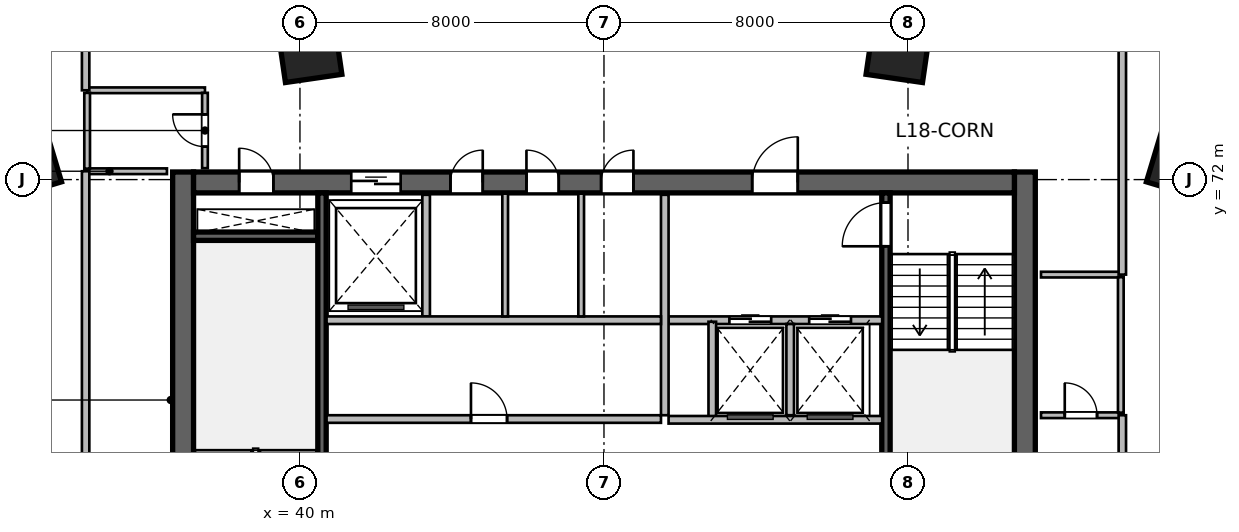
"""IFC4 building model, lengths in metres.
Left out: names, types, materials, properties, quantities, classifications, styles, units other than length and angle.
Written with IfcOpenShell. Run it as: python <this file> out.ifc"""

import sys

from ifc_helpers import new_model, si_unit, direction, frame, frame_2d, origin, origin_2d, place, context, subcontext, project, spatial, rectangle, extrude, source, transform, mapped, element, fill, save


model = new_model("IFC4")
c1 = context("Model", 3, precision=1e-05, world=origin(), true_north=direction((0.0, 1.0)))
c2 = subcontext(c1, "Body", "Model", "MODEL_VIEW")
j1 = project(units=[si_unit("LENGTHUNIT", "METRE"), si_unit("PLANEANGLEUNIT", "RADIAN")], contexts=[c1])
p1 = place(None, origin())
s1 = spatial("IfcSite", under=j1, at=p1, CompositionType="ELEMENT")
p2 = place(p1, origin())
s2 = spatial("IfcBuilding", under=s1, at=p2, CompositionType="ELEMENT")
p3 = place(p2, frame((0.0, 0.0, 78.6)))
s3 = spatial("IfcBuildingStorey", under=s2, at=p3, CompositionType="ELEMENT", Elevation=78.6)
m1 = source(origin(), c2, "Body", "SweptSolid", [
    extrude(rectangle(XDim=12.0, YDim=0.55, at=frame_2d((6.0, 0.0))), origin(), (0.0, 0.0, 1.0), 3.6),
])
for number, where, z_axis, x_axis in (
    (1, (36.925, 60.2, 0.0), (0.0, 0.0, 1.0), (0.0, 1.0, 0.0)),
    (2, (59.075, 60.2, 0.0), (0.0, 0.0, 1.0), (0.0, 1.0, 0.0)),
):
    element("IfcWall", number, at=place(p3, frame(where, z_axis=z_axis, x_axis=x_axis)), inside=s3, PredefinedType="SHEAR", context=c2, shape_type="MappedRepresentation", body=[
        mapped(m1, transform((0.0, 0.0, 0.0), scale=1.0)),
    ])
m2 = source(origin(), c2, "Body", "SweptSolid", [
    extrude(rectangle(XDim=21.6, YDim=0.55, at=frame_2d((10.8, 0.0))), origin(), (0.0, 0.0, 1.0), 3.6),
])
p4 = place(p3, frame((37.2, 71.925, 0.0), z_axis=(0.0, 0.0, 1.0), x_axis=(1.0, 0.0, 0.0)))
e3 = element("IfcWall", 3, at=p4, inside=s3, PredefinedType="SHEAR", context=c2, shape_type="MappedRepresentation", body=[
    mapped(m2, transform((0.0, 0.0, 0.0), scale=1.0)),
])
p5 = place(p4, frame((1.2, 0.0, 0.0)))
e4 = element("IfcOpeningElement", 4, at=p5, cuts=e3, PredefinedType="OPENING", context=c2, shape_type="SweptSolid", body=[
    extrude(rectangle(XDim=0.9, YDim=2.1, at=frame_2d((0.45, 1.05))), frame((0.0, 0.285, 0.0), z_axis=(0.0, -1.0, 0.0), x_axis=(1.0, 0.0, 0.0)), (0.0, 0.0, 1.0), 0.57),
])
p6 = place(p4, frame((14.7, 0.0, 0.0)))
e5 = element("IfcOpeningElement", 5, at=p6, cuts=e3, PredefinedType="OPENING", context=c2, shape_type="SweptSolid", body=[
    extrude(rectangle(XDim=1.2, YDim=2.15, at=frame_2d((0.6, 1.075))), frame((0.0, 0.285, 0.0), z_axis=(0.0, -1.0, 0.0), x_axis=(1.0, 0.0, 0.0)), (0.0, 0.0, 1.0), 0.57),
])
p7 = place(p4, frame((4.15, 0.0, 0.0)))
e6 = element("IfcOpeningElement", 6, at=p7, cuts=e3, PredefinedType="OPENING", context=c2, shape_type="SweptSolid", body=[
    extrude(rectangle(XDim=1.3, YDim=2.15, at=frame_2d((0.65, 1.075))), frame((0.0, 0.285, 0.0), z_axis=(0.0, -1.0, 0.0), x_axis=(1.0, 0.0, 0.0)), (0.0, 0.0, 1.0), 0.57),
])
p8 = place(p4, frame((6.76, 0.0, 0.0)))
e7 = element("IfcOpeningElement", 7, at=p8, cuts=e3, PredefinedType="OPENING", context=c2, shape_type="SweptSolid", body=[
    extrude(rectangle(XDim=0.85, YDim=2.1, at=frame_2d((0.425, 1.05))), frame((0.0, 0.285, 0.0), z_axis=(0.0, -1.0, 0.0), x_axis=(1.0, 0.0, 0.0)), (0.0, 0.0, 1.0), 0.57),
])
p9 = place(p4, frame((8.76, 0.0, 0.0)))
e8 = element("IfcOpeningElement", 8, at=p9, cuts=e3, PredefinedType="OPENING", context=c2, shape_type="SweptSolid", body=[
    extrude(rectangle(XDim=0.85, YDim=2.1, at=frame_2d((0.425, 1.05))), frame((0.0, 0.285, 0.0), z_axis=(0.0, -1.0, 0.0), x_axis=(1.0, 0.0, 0.0)), (0.0, 0.0, 1.0), 0.57),
])
p10 = place(p4, frame((10.725, 0.0, 0.0)))
e9 = element("IfcOpeningElement", 9, at=p10, cuts=e3, PredefinedType="OPENING", context=c2, shape_type="SweptSolid", body=[
    extrude(rectangle(XDim=0.85, YDim=2.1, at=frame_2d((0.425, 1.05))), frame((0.0, 0.285, 0.0), z_axis=(0.0, -1.0, 0.0), x_axis=(1.0, 0.0, 0.0)), (0.0, 0.0, 1.0), 0.57),
])
m3 = source(origin(), c2, "Body", "SweptSolid", [
    extrude(rectangle(XDim=3.27, YDim=0.22, at=frame_2d((1.635, 0.0))), origin(), (0.0, 0.0, 1.0), 3.6),
])
p11 = place(p3, frame((37.2, 70.51, 0.0), z_axis=(0.0, 0.0, 1.0), x_axis=(1.0, 0.0, 0.0)))
e10 = element("IfcWall", 10, at=p11, inside=s3, PredefinedType="SHEAR", context=c2, shape_type="MappedRepresentation", body=[
    mapped(m3, transform((0.0, 0.0, 0.0), scale=1.0)),
])
m4 = source(origin(), c2, "Body", "SweptSolid", [
    extrude(rectangle(XDim=10.9, YDim=0.22, at=frame_2d((5.45, 0.0))), origin(), (0.0, 0.0, 1.0), 3.6),
])
p12 = place(p3, frame((40.58, 60.75, 0.0), z_axis=(0.0, 0.0, 1.0), x_axis=(0.0, 1.0, 0.0)))
e11 = element("IfcWall", 11, at=p12, inside=s3, PredefinedType="SHEAR", context=c2, shape_type="MappedRepresentation", body=[
    mapped(m4, transform((0.0, 0.0, 0.0), scale=1.0)),
])
p13 = place(p3, frame((55.42, 60.75, 0.0), z_axis=(0.0, 0.0, 1.0), x_axis=(0.0, 1.0, 0.0)))
e12 = element("IfcWall", 12, at=p13, inside=s3, PredefinedType="SHEAR", context=c2, shape_type="MappedRepresentation", body=[
    mapped(m4, transform((0.0, 0.0, 0.0), scale=1.0)),
])
p14 = place(p13, frame((9.495, 0.0, 0.0)))
e13 = element("IfcOpeningElement", 13, at=p14, cuts=e12, PredefinedType="OPENING", context=c2, shape_type="SweptSolid", body=[
    extrude(rectangle(XDim=1.15, YDim=2.15, at=frame_2d((0.575, 1.075))), frame((0.0, 0.12, 0.0), z_axis=(0.0, -1.0, 0.0), x_axis=(1.0, 0.0, 0.0)), (0.0, 0.0, 1.0), 0.24),
])
m5 = source(origin(), c2, "Body", "SweptSolid", [
    extrude(rectangle(XDim=1.5, YDim=1.5, at=origin_2d()), origin(), (0.0, 0.0, 1.0), 3.6),
])
for number, where, z_axis, x_axis in (
    (14, (32.791, 72.442, 0.0), (0.0, 0.0, 1.0), (-0.289, 0.957, 0.0)),
    (15, (40.253, 75.404, 0.0), (0.0, 0.0, 1.0), (-0.143, 0.99, 0.0)),
    (16, (55.747, 75.404, 0.0), (0.0, 0.0, 1.0), (0.143, 0.99, 0.0)),
    (17, (63.209, 72.442, 0.0), (0.0, 0.0, 1.0), (0.289, 0.957, 0.0)),
):
    element("IfcColumn", number, at=place(p3, frame(where, z_axis=z_axis, x_axis=x_axis)), inside=s3, PredefinedType="COLUMN", context=c2, shape_type="MappedRepresentation", body=[
        mapped(m5, transform((0.0, 0.0, 0.0), scale=1.0)),
    ])
m6 = source(origin(), c2, "Body", "SweptSolid", [
    extrude(rectangle(XDim=5.62, YDim=0.2, at=frame_2d((2.81, 0.0))), origin(), (0.0, 0.0, 1.0), 3.36),
])
p15 = place(p3, frame((49.7, 68.3, 0.0), z_axis=(0.0, 0.0, 1.0), x_axis=(1.0, 0.0, 0.0)))
e18 = element("IfcWall", 18, at=p15, inside=s3, PredefinedType="SOLIDWALL", context=c2, shape_type="MappedRepresentation", body=[
    mapped(m6, transform((0.0, 0.0, 0.0), scale=1.0)),
])
p16 = place(p15, frame((1.6, 0.0, 0.0)))
e19 = element("IfcOpeningElement", 19, at=p16, cuts=e18, PredefinedType="OPENING", context=c2, shape_type="SweptSolid", body=[
    extrude(rectangle(XDim=1.1, YDim=2.15, at=frame_2d((0.55, 1.075))), frame((0.0, 0.11, 0.0), z_axis=(0.0, -1.0, 0.0), x_axis=(1.0, 0.0, 0.0)), (0.0, 0.0, 1.0), 0.22),
])
p17 = place(p15, frame((3.7, 0.0, 0.0)))
e20 = element("IfcOpeningElement", 20, at=p17, cuts=e18, PredefinedType="OPENING", context=c2, shape_type="SweptSolid", body=[
    extrude(rectangle(XDim=1.1, YDim=2.15, at=frame_2d((0.55, 1.075))), frame((0.0, 0.11, 0.0), z_axis=(0.0, -1.0, 0.0), x_axis=(1.0, 0.0, 0.0)), (0.0, 0.0, 1.0), 0.22),
])
m7 = source(origin(), c2, "Body", "SweptSolid", [
    extrude(rectangle(XDim=5.8, YDim=0.2, at=frame_2d((2.9, 0.0))), origin(), (0.0, 0.0, 1.0), 3.36),
])
p18 = place(p3, frame((49.6, 65.8, 0.0), z_axis=(0.0, 0.0, 1.0), x_axis=(0.0, 1.0, 0.0)))
e21 = element("IfcWall", 21, at=p18, inside=s3, PredefinedType="SOLIDWALL", context=c2, shape_type="MappedRepresentation", body=[
    mapped(m7, transform((0.0, 0.0, 0.0), scale=1.0)),
])
m8 = source(origin(), c2, "Body", "SweptSolid", [
    extrude(rectangle(XDim=2.58, YDim=0.2, at=frame_2d((1.29, 0.0))), origin(), (0.0, 0.0, 1.0), 3.36),
])
p19 = place(p3, frame((50.85, 65.68, 0.0), z_axis=(0.0, 0.0, 1.0), x_axis=(0.0, 1.0, 0.0)))
e22 = element("IfcWall", 22, at=p19, inside=s3, PredefinedType="SOLIDWALL", context=c2, shape_type="MappedRepresentation", body=[
    mapped(m8, transform((0.0, 0.0, 0.0), scale=1.0)),
])
m9 = source(origin(), c2, "Body", "SweptSolid", [
    extrude(rectangle(XDim=2.4, YDim=0.2, at=frame_2d((1.2, 0.0))), origin(), (0.0, 0.0, 1.0), 3.36),
])
p20 = place(p3, frame((52.9, 65.8, 0.0), z_axis=(0.0, 0.0, 1.0), x_axis=(0.0, 1.0, 0.0)))
e23 = element("IfcWall", 23, at=p20, inside=s3, PredefinedType="SOLIDWALL", context=c2, shape_type="MappedRepresentation", body=[
    mapped(m9, transform((0.0, 0.0, 0.0), scale=1.0)),
])
p21 = place(p3, frame((49.7, 65.68, 0.0), z_axis=(0.0, 0.0, 1.0), x_axis=(1.0, 0.0, 0.0)))
e24 = element("IfcWall", 24, at=p21, inside=s3, PredefinedType="SOLIDWALL", context=c2, shape_type="MappedRepresentation", body=[
    mapped(m6, transform((0.0, 0.0, 0.0), scale=1.0)),
])
m10 = source(origin(), c2, "Body", "SweptSolid", [
    extrude(rectangle(XDim=3.2, YDim=0.2, at=frame_2d((1.6, 0.0))), origin(), (0.0, 0.0, 1.0), 3.36),
])
p22 = place(p3, frame((43.32, 68.4, 0.0), z_axis=(0.0, 0.0, 1.0), x_axis=(0.0, 1.0, 0.0)))
e25 = element("IfcWall", 25, at=p22, inside=s3, PredefinedType="SOLIDWALL", context=c2, shape_type="MappedRepresentation", body=[
    mapped(m10, transform((0.0, 0.0, 0.0), scale=1.0)),
])
m11 = source(origin(), c2, "Body", "SweptSolid", [
    extrude(rectangle(XDim=8.8, YDim=0.2, at=frame_2d((4.4, 0.0))), origin(), (0.0, 0.0, 1.0), 3.36),
])
p23 = place(p3, frame((40.7, 68.3, 0.0), z_axis=(0.0, 0.0, 1.0), x_axis=(1.0, 0.0, 0.0)))
e26 = element("IfcWall", 26, at=p23, inside=s3, PredefinedType="SOLIDWALL", context=c2, shape_type="MappedRepresentation", body=[
    mapped(m11, transform((0.0, 0.0, 0.0), scale=1.0)),
])
m12 = source(origin(), c2, "Body", "SweptSolid", [
    extrude(rectangle(XDim=3.23, YDim=0.15, at=frame_2d((1.615, 0.0))), origin(), (0.0, 0.0, 1.0), 3.36),
])
for number, where, z_axis, x_axis in (
    (27, (45.4, 68.4, 0.0), (0.0, 0.0, 1.0), (0.0, 1.0, 0.0)),
    (28, (47.4, 68.4, 0.0), (0.0, 0.0, 1.0), (0.0, 1.0, 0.0)),
):
    element("IfcWall", number, at=place(p3, frame(where, z_axis=z_axis, x_axis=x_axis)), inside=s3, PredefinedType="PARTITIONING", context=c2, shape_type="MappedRepresentation", body=[
        mapped(m12, transform((0.0, 0.0, 0.0), scale=1.0)),
    ])
p24 = place(p3, frame((40.7, 65.7, 0.0), z_axis=(0.0, 0.0, 1.0), x_axis=(1.0, 0.0, 0.0)))
e29 = element("IfcWall", 29, at=p24, inside=s3, PredefinedType="SOLIDWALL", context=c2, shape_type="MappedRepresentation", body=[
    mapped(m11, transform((0.0, 0.0, 0.0), scale=1.0)),
])
p25 = place(p24, frame((3.8, 0.0, 0.0)))
e30 = element("IfcOpeningElement", 30, at=p25, cuts=e29, PredefinedType="OPENING", context=c2, shape_type="SweptSolid", body=[
    extrude(rectangle(XDim=0.95, YDim=2.15, at=frame_2d((0.475, 1.075))), frame((0.0, 0.11, 0.0), z_axis=(0.0, -1.0, 0.0), x_axis=(1.0, 0.0, 0.0)), (0.0, 0.0, 1.0), 0.22),
])
m13 = source(origin(), c2, "Body", "SweptSolid", [
    extrude(rectangle(XDim=2.1, YDim=0.15, at=frame_2d((1.05, 0.0))), origin(), (0.0, 0.0, 1.0), 3.36),
])
p26 = place(p3, frame((34.4, 72.22, 0.0), z_axis=(0.0, 0.0, 1.0), x_axis=(1.0, 0.0, 0.0)))
e31 = element("IfcWall", 31, at=p26, inside=s3, PredefinedType="PARTITIONING", context=c2, shape_type="MappedRepresentation", body=[
    mapped(m13, transform((0.0, 0.0, 0.0), scale=1.0)),
])
m14 = source(origin(), c2, "Body", "SweptSolid", [
    extrude(rectangle(XDim=3.1, YDim=0.15, at=frame_2d((1.55, 0.0))), origin(), (0.0, 0.0, 1.0), 2.729),
])
p27 = place(p3, frame((34.4, 74.35, 0.0), z_axis=(0.0, 0.0, 1.0), x_axis=(1.0, 0.0, 0.0)))
e32 = element("IfcWall", 32, at=p27, inside=s3, PredefinedType="PARTITIONING", context=c2, shape_type="MappedRepresentation", body=[
    mapped(m14, transform((0.0, 0.0, 0.0), scale=1.0)),
])
m15 = source(origin(), c2, "Body", "SweptSolid", [
    extrude(rectangle(XDim=1.995, YDim=0.15, at=frame_2d((0.998, 0.0))), origin(), (0.0, 0.0, 1.0), 3.36),
])
p28 = place(p3, frame((34.4, 72.288, 0.0), z_axis=(0.0, 0.0, 1.0), x_axis=(0.0, 1.0, 0.0)))
e33 = element("IfcWall", 33, at=p28, inside=s3, PredefinedType="PARTITIONING", context=c2, shape_type="MappedRepresentation", body=[
    mapped(m15, transform((0.0, 0.0, 0.0), scale=1.0)),
])
m16 = source(origin(), c2, "Body", "SweptSolid", [
    extrude(rectangle(XDim=1.982, YDim=0.15, at=frame_2d((0.991, 0.0))), origin(), (0.0, 0.0, 1.0), 3.36),
])
p29 = place(p3, frame((37.5, 72.3, 0.0), z_axis=(0.0, 0.0, 1.0), x_axis=(0.0, 1.0, 0.0)))
e34 = element("IfcWall", 34, at=p29, inside=s3, PredefinedType="PARTITIONING", context=c2, shape_type="MappedRepresentation", body=[
    mapped(m16, transform((0.0, 0.0, 0.0), scale=1.0)),
])
p30 = place(p29, frame((0.566, 0.0, 0.0)))
e35 = element("IfcOpeningElement", 35, at=p30, cuts=e34, PredefinedType="OPENING", context=c2, shape_type="SweptSolid", body=[
    extrude(rectangle(XDim=0.85, YDim=2.1, at=frame_2d((0.425, 1.05))), frame((0.0, 0.085, 0.0), z_axis=(0.0, -1.0, 0.0), x_axis=(1.0, 0.0, 0.0)), (0.0, 0.0, 1.0), 0.17),
])
p31 = place(p3, frame((59.5, 65.8, 0.0), z_axis=(0.0, 0.0, 1.0), x_axis=(1.0, 0.0, 0.0)))
e36 = element("IfcWall", 36, at=p31, inside=s3, PredefinedType="PARTITIONING", context=c2, shape_type="MappedRepresentation", body=[
    mapped(m13, transform((0.0, 0.0, 0.0), scale=1.0)),
])
p32 = place(p31, frame((0.625, 0.0, 0.0)))
e37 = element("IfcOpeningElement", 37, at=p32, cuts=e36, PredefinedType="OPENING", context=c2, shape_type="SweptSolid", body=[
    extrude(rectangle(XDim=0.85, YDim=2.1, at=frame_2d((0.425, 1.05))), frame((0.0, 0.085, 0.0), z_axis=(0.0, -1.0, 0.0), x_axis=(1.0, 0.0, 0.0)), (0.0, 0.0, 1.0), 0.17),
])
p33 = place(p3, frame((59.5, 69.5, 0.0), z_axis=(0.0, 0.0, 1.0), x_axis=(1.0, 0.0, 0.0)))
e38 = element("IfcWall", 38, at=p33, inside=s3, PredefinedType="PARTITIONING", context=c2, shape_type="MappedRepresentation", body=[
    mapped(m13, transform((0.0, 0.0, 0.0), scale=1.0)),
])
m17 = source(origin(), c2, "Body", "SweptSolid", [
    extrude(rectangle(XDim=3.565, YDim=0.15, at=frame_2d((1.783, 0.0))), origin(), (0.0, 0.0, 1.0), 3.36),
])
p34 = place(p3, frame((61.6, 65.867, 0.0), z_axis=(0.0, 0.0, 1.0), x_axis=(0.0, 1.0, 0.0)))
e39 = element("IfcWall", 39, at=p34, inside=s3, PredefinedType="PARTITIONING", context=c2, shape_type="MappedRepresentation", body=[
    mapped(m17, transform((0.0, 0.0, 0.0), scale=1.0)),
])
m18 = source(origin(), c2, "Body", "SweptSolid", [
    extrude(rectangle(XDim=8.18, YDim=0.195, at=frame_2d((4.09, 0.0))), origin(), (0.0, 0.0, 1.0), 3.36),
])
p35 = place(p3, frame((34.36, 64.04, 0.0), z_axis=(0.0, 0.0, 1.0), x_axis=(0.0, 1.0, 0.0)))
e40 = element("IfcWall", 40, at=p35, inside=s3, PredefinedType="PARTITIONING", context=c2, shape_type="MappedRepresentation", body=[
    mapped(m18, transform((0.0, 0.0, 0.0), scale=1.0)),
])
m19 = source(origin(), c2, "Body", "SweptSolid", [
    extrude(rectangle(XDim=3.474, YDim=0.195, at=frame_2d((1.737, 0.0))), origin(), (0.0, 0.0, 1.0), 3.36),
])
p36 = place(p3, frame((34.36, 74.35, 0.0), z_axis=(0.0, 0.0, 1.0), x_axis=(0.0, 1.0, 0.0)))
e41 = element("IfcWall", 41, at=p36, inside=s3, PredefinedType="PARTITIONING", context=c2, shape_type="MappedRepresentation", body=[
    mapped(m19, transform((0.0, 0.0, 0.0), scale=1.0)),
])
m20 = source(origin(), c2, "Body", "SweptSolid", [
    extrude(rectangle(XDim=1.76, YDim=0.195, at=frame_2d((0.88, 0.0))), origin(), (0.0, 0.0, 1.0), 3.36),
])
p37 = place(p3, frame((61.64, 64.04, 0.0), z_axis=(0.0, 0.0, 1.0), x_axis=(0.0, 1.0, 0.0)))
e42 = element("IfcWall", 42, at=p37, inside=s3, PredefinedType="PARTITIONING", context=c2, shape_type="MappedRepresentation", body=[
    mapped(m20, transform((0.0, 0.0, 0.0), scale=1.0)),
])
m21 = source(origin(), c2, "Body", "SweptSolid", [
    extrude(rectangle(XDim=8.324, YDim=0.195, at=frame_2d((4.162, 0.0))), origin(), (0.0, 0.0, 1.0), 3.36),
])
p38 = place(p3, frame((61.64, 69.5, 0.0), z_axis=(0.0, 0.0, 1.0), x_axis=(0.0, 1.0, 0.0)))
e43 = element("IfcWall", 43, at=p38, inside=s3, PredefinedType="PARTITIONING", context=c2, shape_type="MappedRepresentation", body=[
    mapped(m21, transform((0.0, 0.0, 0.0), scale=1.0)),
])
m22 = source(origin(), c2, "Body", "SweptSolid", [
    extrude(rectangle(XDim=0.9, YDim=2.1, at=frame_2d((0.45, 1.05))), frame((0.0, 0.025, 0.0), z_axis=(0.0, -1.0, 0.0), x_axis=(1.0, 0.0, 0.0)), (0.0, 0.0, 1.0), 0.05),
])
p39 = place(p5, origin())
e44 = element("IfcDoor", 44, at=p39, inside=s3, OperationType="SINGLE_SWING_LEFT", PredefinedType="DOOR", context=c2, shape_type="MappedRepresentation", body=[
    mapped(m22, transform((0.0, 0.0, 0.0), scale=1.0)),
])
fill(e4, e44)
m23 = source(origin(), c2, "Body", "SweptSolid", [
    extrude(rectangle(XDim=1.15, YDim=2.15, at=frame_2d((0.575, 1.075))), frame((0.0, 0.025, 0.0), z_axis=(0.0, -1.0, 0.0), x_axis=(1.0, 0.0, 0.0)), (0.0, 0.0, 1.0), 0.05),
])
p40 = place(p14, origin())
e45 = element("IfcDoor", 45, at=p40, inside=s3, OperationType="SINGLE_SWING_LEFT", PredefinedType="DOOR", context=c2, shape_type="MappedRepresentation", body=[
    mapped(m23, transform((0.0, 0.0, 0.0), scale=1.0)),
])
fill(e13, e45)
m24 = source(origin(), c2, "Body", "SweptSolid", [
    extrude(rectangle(XDim=1.2, YDim=2.15, at=frame_2d((0.6, 1.075))), frame((0.0, 0.025, 0.0), z_axis=(0.0, -1.0, 0.0), x_axis=(1.0, 0.0, 0.0)), (0.0, 0.0, 1.0), 0.05),
])
p41 = place(p6, origin())
e46 = element("IfcDoor", 46, at=p41, inside=s3, OperationType="SINGLE_SWING_RIGHT", PredefinedType="DOOR", context=c2, shape_type="MappedRepresentation", body=[
    mapped(m24, transform((0.0, 0.0, 0.0), scale=1.0)),
])
fill(e5, e46)
m25 = source(origin(), c2, "Body", "SweptSolid", [
    extrude(rectangle(XDim=1.1, YDim=2.15, at=frame_2d((0.55, 1.075))), frame((0.0, 0.025, 0.0), z_axis=(0.0, -1.0, 0.0), x_axis=(1.0, 0.0, 0.0)), (0.0, 0.0, 1.0), 0.05),
])
p42 = place(p16, origin())
e47 = element("IfcDoor", 47, at=p42, inside=s3, OperationType="DOUBLE_DOOR_SLIDING", PredefinedType="DOOR", context=c2, shape_type="MappedRepresentation", body=[
    mapped(m25, transform((0.0, 0.0, 0.0), scale=1.0)),
])
fill(e19, e47)
p43 = place(p17, origin())
e48 = element("IfcDoor", 48, at=p43, inside=s3, OperationType="DOUBLE_DOOR_SLIDING", PredefinedType="DOOR", context=c2, shape_type="MappedRepresentation", body=[
    mapped(m25, transform((0.0, 0.0, 0.0), scale=1.0)),
])
fill(e20, e48)
m26 = source(origin(), c2, "Body", "SweptSolid", [
    extrude(rectangle(XDim=1.3, YDim=2.15, at=frame_2d((0.65, 1.075))), frame((0.0, 0.025, 0.0), z_axis=(0.0, -1.0, 0.0), x_axis=(1.0, 0.0, 0.0)), (0.0, 0.0, 1.0), 0.05),
])
p44 = place(p7, origin())
e49 = element("IfcDoor", 49, at=p44, inside=s3, OperationType="DOUBLE_DOOR_SLIDING", PredefinedType="DOOR", context=c2, shape_type="MappedRepresentation", body=[
    mapped(m26, transform((0.0, 0.0, 0.0), scale=1.0)),
])
fill(e6, e49)
m27 = source(origin(), c2, "Body", "SweptSolid", [
    extrude(rectangle(XDim=0.85, YDim=2.1, at=frame_2d((0.425, 1.05))), frame((0.0, 0.025, 0.0), z_axis=(0.0, -1.0, 0.0), x_axis=(1.0, 0.0, 0.0)), (0.0, 0.0, 1.0), 0.05),
])
p45 = place(p8, origin())
e50 = element("IfcDoor", 50, at=p45, inside=s3, OperationType="SINGLE_SWING_RIGHT", PredefinedType="DOOR", context=c2, shape_type="MappedRepresentation", body=[
    mapped(m27, transform((0.0, 0.0, 0.0), scale=1.0)),
])
fill(e7, e50)
p46 = place(p9, origin())
e51 = element("IfcDoor", 51, at=p46, inside=s3, OperationType="SINGLE_SWING_LEFT", PredefinedType="DOOR", context=c2, shape_type="MappedRepresentation", body=[
    mapped(m27, transform((0.0, 0.0, 0.0), scale=1.0)),
])
fill(e8, e51)
p47 = place(p10, origin())
e52 = element("IfcDoor", 52, at=p47, inside=s3, OperationType="SINGLE_SWING_RIGHT", PredefinedType="DOOR", context=c2, shape_type="MappedRepresentation", body=[
    mapped(m27, transform((0.0, 0.0, 0.0), scale=1.0)),
])
fill(e9, e52)
m28 = source(origin(), c2, "Body", "SweptSolid", [
    extrude(rectangle(XDim=0.95, YDim=2.15, at=frame_2d((0.475, 1.075))), frame((0.0, 0.025, 0.0), z_axis=(0.0, -1.0, 0.0), x_axis=(1.0, 0.0, 0.0)), (0.0, 0.0, 1.0), 0.05),
])
p48 = place(p25, origin())
e53 = element("IfcDoor", 53, at=p48, inside=s3, OperationType="SINGLE_SWING_LEFT", PredefinedType="DOOR", context=c2, shape_type="MappedRepresentation", body=[
    mapped(m28, transform((0.0, 0.0, 0.0), scale=1.0)),
])
fill(e30, e53)
p49 = place(p30, origin())
e54 = element("IfcDoor", 54, at=p49, inside=s3, OperationType="SINGLE_SWING_RIGHT", PredefinedType="DOOR", context=c2, shape_type="MappedRepresentation", body=[
    mapped(m27, transform((0.0, 0.0, 0.0), scale=1.0)),
])
fill(e35, e54)
p50 = place(p32, origin())
e55 = element("IfcDoor", 55, at=p50, inside=s3, OperationType="SINGLE_SWING_LEFT", PredefinedType="DOOR", context=c2, shape_type="MappedRepresentation", body=[
    mapped(m27, transform((0.0, 0.0, 0.0), scale=1.0)),
])
fill(e37, e55)
save(model, sys.argv[1])
